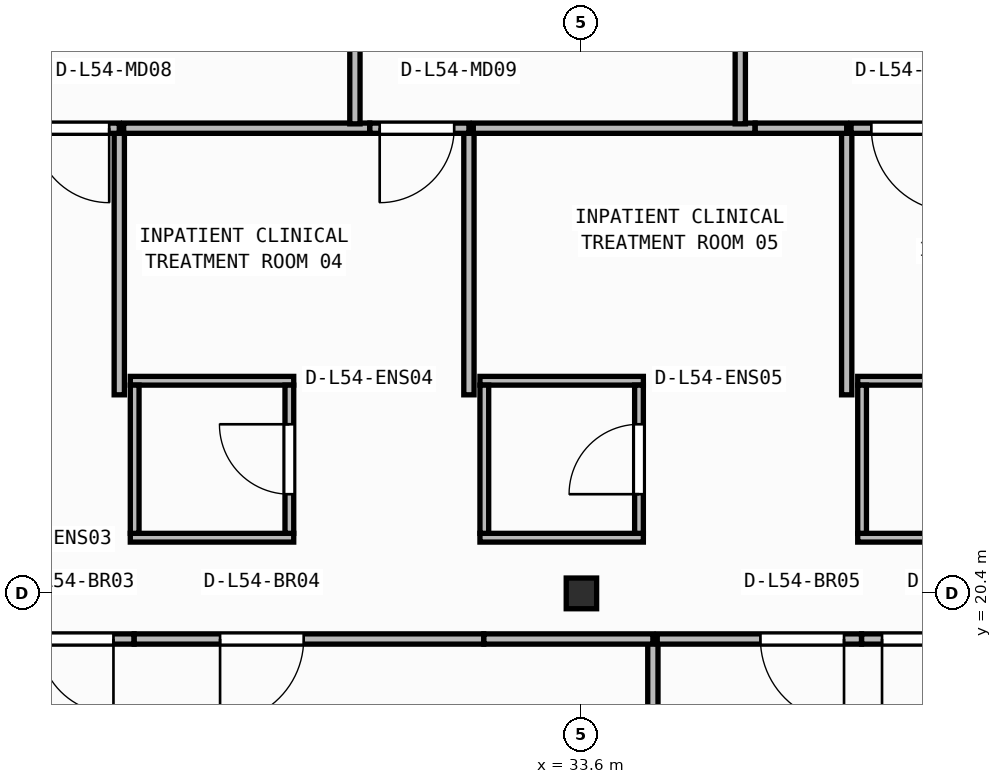
"""IFC4 building model, lengths in metres.
Left out: names, types, materials, properties, quantities, classifications, styles, units other than length and angle.
Written with IfcOpenShell. Run it as: python <this file> out.ifc"""

import sys

from ifc_helpers import new_model, si_unit, direction, frame, frame_2d, origin, origin_2d, place, context, subcontext, project, spatial, rectangle, i_section, extrude, element, fill, save


model = new_model("IFC4")
c1 = context("Model", 3, precision=1e-05, world=origin(), true_north=direction((0.0, 1.0)))
c2 = subcontext(c1, "Body", "Model", "MODEL_VIEW")
j1 = project(units=[si_unit("LENGTHUNIT", "METRE"), si_unit("PLANEANGLEUNIT", "RADIAN")], contexts=[c1])
p1 = place(None, origin())
s1 = spatial("IfcSite", under=j1, at=p1, CompositionType="ELEMENT")
p2 = place(p1, origin())
s2 = spatial("IfcBuilding", under=s1, at=p2, CompositionType="ELEMENT")
p3 = place(p2, frame((0.0, 0.0, 219.75)))
s3 = spatial("IfcBuildingStorey", under=s2, at=p3, CompositionType="ELEMENT", Elevation=219.75)
p4 = place(p3, frame((33.6, 20.4, 0.0), z_axis=(0.0, 0.0, 1.0), x_axis=(1.0, 0.0, 0.0)))
e1 = element("IfcColumn", 1, at=p4, inside=s3, PredefinedType="COLUMN", context=c2, shape_type="SweptSolid", body=[
    extrude(i_section(OverallWidth=0.4, OverallDepth=0.404, WebThickness=0.02, FlangeThickness=0.032, at=origin_2d()), origin(), (0.0, 0.0, 1.0), 3.95),
])
for number, where, z_axis, x_axis in (
    (2, (27.665, 21.133, 0.0), (0.0, 0.0, 1.0), (1.0, 0.0, 0.0)),
    (3, (27.665, 23.198, 0.0), (0.0, 0.0, 1.0), (1.0, 0.0, 0.0)),
):
    element("IfcWall", number, at=place(p3, frame(where, z_axis=z_axis, x_axis=x_axis)), inside=s3, PredefinedType="PARTITIONING", context=c2, shape_type="SweptSolid", body=[
        extrude(rectangle(XDim=2.15, YDim=0.115, at=frame_2d((1.075, 0.0))), origin(), (0.0, 0.0, 1.0), 3.71),
    ])
p5 = place(p3, frame((27.722, 21.19, 0.0), z_axis=(0.0, 0.0, 1.0), x_axis=(0.0, 1.0, 0.0)))
e4 = element("IfcWall", 4, at=p5, inside=s3, PredefinedType="PARTITIONING", context=c2, shape_type="SweptSolid", body=[
    extrude(rectangle(XDim=1.95, YDim=0.115, at=frame_2d((0.975, 0.0))), origin(), (0.0, 0.0, 1.0), 3.71),
])
p6 = place(p3, frame((29.758, 21.19, 0.0), z_axis=(0.0, 0.0, 1.0), x_axis=(0.0, 1.0, 0.0)))
e5 = element("IfcWall", 5, at=p6, inside=s3, PredefinedType="PARTITIONING", context=c2, shape_type="SweptSolid", body=[
    extrude(rectangle(XDim=1.95, YDim=0.115, at=frame_2d((0.975, 0.0))), origin(), (0.0, 0.0, 1.0), 3.71),
])
p7 = place(p6, frame((0.515, 0.0, 0.0)))
e6 = element("IfcOpeningElement", 6, at=p7, cuts=e5, PredefinedType="OPENING", context=c2, shape_type="SweptSolid", body=[
    extrude(rectangle(XDim=0.92, YDim=2.1, at=frame_2d((0.46, 1.05))), frame((0.0, 0.067, 0.0), z_axis=(0.0, -1.0, 0.0), x_axis=(1.0, 0.0, 0.0)), (0.0, 0.0, 1.0), 0.135),
])
for number, where, z_axis, x_axis in (
    (7, (32.265, 21.133, 0.0), (0.0, 0.0, 1.0), (1.0, 0.0, 0.0)),
    (8, (32.265, 23.198, 0.0), (0.0, 0.0, 1.0), (1.0, 0.0, 0.0)),
):
    element("IfcWall", number, at=place(p3, frame(where, z_axis=z_axis, x_axis=x_axis)), inside=s3, PredefinedType="PARTITIONING", context=c2, shape_type="SweptSolid", body=[
        extrude(rectangle(XDim=2.15, YDim=0.115, at=frame_2d((1.075, 0.0))), origin(), (0.0, 0.0, 1.0), 3.71),
    ])
p8 = place(p3, frame((32.323, 21.19, 0.0), z_axis=(0.0, 0.0, 1.0), x_axis=(0.0, 1.0, 0.0)))
e9 = element("IfcWall", 9, at=p8, inside=s3, PredefinedType="PARTITIONING", context=c2, shape_type="SweptSolid", body=[
    extrude(rectangle(XDim=1.95, YDim=0.115, at=frame_2d((0.975, 0.0))), origin(), (0.0, 0.0, 1.0), 3.71),
])
p9 = place(p3, frame((34.357, 21.19, 0.0), z_axis=(0.0, 0.0, 1.0), x_axis=(0.0, 1.0, 0.0)))
e10 = element("IfcWall", 10, at=p9, inside=s3, PredefinedType="PARTITIONING", context=c2, shape_type="SweptSolid", body=[
    extrude(rectangle(XDim=1.95, YDim=0.115, at=frame_2d((0.975, 0.0))), origin(), (0.0, 0.0, 1.0), 3.71),
])
p10 = place(p9, frame((0.515, 0.0, 0.0)))
e11 = element("IfcOpeningElement", 11, at=p10, cuts=e10, PredefinedType="OPENING", context=c2, shape_type="SweptSolid", body=[
    extrude(rectangle(XDim=0.92, YDim=2.1, at=frame_2d((0.46, 1.05))), frame((0.0, 0.067, 0.0), z_axis=(0.0, -1.0, 0.0), x_axis=(1.0, 0.0, 0.0)), (0.0, 0.0, 1.0), 0.135),
])
for number, where, z_axis, x_axis in (
    (12, (37.235, 21.133, 0.0), (0.0, 0.0, 1.0), (1.0, 0.0, 0.0)),
    (13, (37.235, 23.198, 0.0), (0.0, 0.0, 1.0), (1.0, 0.0, 0.0)),
):
    element("IfcWall", number, at=place(p3, frame(where, z_axis=z_axis, x_axis=x_axis)), inside=s3, PredefinedType="PARTITIONING", context=c2, shape_type="SweptSolid", body=[
        extrude(rectangle(XDim=2.15, YDim=0.115, at=frame_2d((1.075, 0.0))), origin(), (0.0, 0.0, 1.0), 3.71),
    ])
p11 = place(p3, frame((37.292, 21.19, 0.0), z_axis=(0.0, 0.0, 1.0), x_axis=(0.0, 1.0, 0.0)))
e14 = element("IfcWall", 14, at=p11, inside=s3, PredefinedType="PARTITIONING", context=c2, shape_type="SweptSolid", body=[
    extrude(rectangle(XDim=1.95, YDim=0.115, at=frame_2d((0.975, 0.0))), origin(), (0.0, 0.0, 1.0), 3.71),
])
p12 = place(p3, frame((34.54, 14.76, 0.0), z_axis=(0.0, 0.0, 1.0), x_axis=(0.0, 1.0, 0.0)))
e15 = element("IfcWall", 15, at=p12, inside=s3, PredefinedType="PARTITIONING", context=c2, shape_type="SweptSolid", body=[
    extrude(rectangle(XDim=5.04, YDim=0.135, at=frame_2d((2.52, 0.0))), origin(), (0.0, 0.0, 1.0), 3.71),
])
p13 = place(p3, frame((27.715, 19.8, 0.0), z_axis=(0.0, 0.0, 1.0), x_axis=(-1.0, 0.0, 0.0)))
e16 = element("IfcWall", 16, at=p13, inside=s3, PredefinedType="PARTITIONING", context=c2, shape_type="SweptSolid", body=[
    extrude(rectangle(XDim=4.228, YDim=0.135, at=frame_2d((2.114, 0.0))), origin(), (0.0, 0.0, 1.0), 3.71),
])
p14 = place(p13, frame((0.271, 0.0, 0.0)))
e17 = element("IfcOpeningElement", 17, at=p14, cuts=e16, PredefinedType="OPENING", context=c2, shape_type="SweptSolid", body=[
    extrude(rectangle(XDim=0.98, YDim=2.1, at=frame_2d((0.49, 1.05))), frame((0.0, 0.077, 0.0), z_axis=(0.0, -1.0, 0.0), x_axis=(1.0, 0.0, 0.0)), (0.0, 0.0, 1.0), 0.155),
])
p15 = place(p3, frame((32.315, 19.8, 0.0), z_axis=(0.0, 0.0, 1.0), x_axis=(-1.0, 0.0, 0.0)))
e18 = element("IfcWall", 18, at=p15, inside=s3, PredefinedType="PARTITIONING", context=c2, shape_type="SweptSolid", body=[
    extrude(rectangle(XDim=4.598, YDim=0.135, at=frame_2d((2.299, 0.0))), origin(), (0.0, 0.0, 1.0), 3.71),
])
p16 = place(p15, frame((2.369, 0.0, 0.0)))
e19 = element("IfcOpeningElement", 19, at=p16, cuts=e18, PredefinedType="OPENING", context=c2, shape_type="SweptSolid", body=[
    extrude(rectangle(XDim=1.1, YDim=2.1, at=frame_2d((0.55, 1.05))), frame((0.0, 0.077, 0.0), z_axis=(0.0, -1.0, 0.0), x_axis=(1.0, 0.0, 0.0)), (0.0, 0.0, 1.0), 0.155),
])
p17 = place(p3, frame((34.54, 19.8, 0.0), z_axis=(0.0, 0.0, 1.0), x_axis=(-1.0, 0.0, 0.0)))
e20 = element("IfcWall", 20, at=p17, inside=s3, PredefinedType="PARTITIONING", context=c2, shape_type="SweptSolid", body=[
    extrude(rectangle(XDim=2.223, YDim=0.135, at=frame_2d((1.112, 0.0))), origin(), (0.0, 0.0, 1.0), 3.71),
])
p18 = place(p3, frame((37.285, 19.8, 0.0), z_axis=(0.0, 0.0, 1.0), x_axis=(-1.0, 0.0, 0.0)))
e21 = element("IfcWall", 21, at=p18, inside=s3, PredefinedType="PARTITIONING", context=c2, shape_type="SweptSolid", body=[
    extrude(rectangle(XDim=2.687, YDim=0.135, at=frame_2d((1.344, 0.0))), origin(), (0.0, 0.0, 1.0), 3.71),
])
p19 = place(p18, frame((0.23, 0.0, 0.0)))
e22 = element("IfcOpeningElement", 22, at=p19, cuts=e21, PredefinedType="OPENING", context=c2, shape_type="SweptSolid", body=[
    extrude(rectangle(XDim=1.1, YDim=2.1, at=frame_2d((0.55, 1.05))), frame((0.0, 0.077, 0.0), z_axis=(0.0, -1.0, 0.0), x_axis=(1.0, 0.0, 0.0)), (0.0, 0.0, 1.0), 0.155),
])
p20 = place(p3, frame((41.515, 19.8, 0.0), z_axis=(0.0, 0.0, 1.0), x_axis=(-1.0, 0.0, 0.0)))
e23 = element("IfcWall", 23, at=p20, inside=s3, PredefinedType="PARTITIONING", context=c2, shape_type="SweptSolid", body=[
    extrude(rectangle(XDim=4.228, YDim=0.135, at=frame_2d((2.114, 0.0))), origin(), (0.0, 0.0, 1.0), 3.71),
])
p21 = place(p20, frame((2.86, 0.0, 0.0)))
e24 = element("IfcOpeningElement", 24, at=p21, cuts=e23, PredefinedType="OPENING", context=c2, shape_type="SweptSolid", body=[
    extrude(rectangle(XDim=1.1, YDim=2.1, at=frame_2d((0.55, 1.05))), frame((0.0, 0.077, 0.0), z_axis=(0.0, -1.0, 0.0), x_axis=(1.0, 0.0, 0.0)), (0.0, 0.0, 1.0), 0.155),
])
p22 = place(p3, frame((27.52, 23.012, 0.0), z_axis=(0.0, 0.0, 1.0), x_axis=(0.0, 1.0, 0.0)))
e25 = element("IfcWall", 25, at=p22, inside=s3, PredefinedType="PARTITIONING", context=c2, shape_type="SweptSolid", body=[
    extrude(rectangle(XDim=3.508, YDim=0.135, at=frame_2d((1.754, 0.0))), origin(), (0.0, 0.0, 1.0), 3.71),
])
p23 = place(p3, frame((27.52, 26.52, 0.0), z_axis=(0.0, 0.0, 1.0), x_axis=(-1.0, 0.0, 0.0)))
e26 = element("IfcWall", 26, at=p23, inside=s3, PredefinedType="PARTITIONING", context=c2, shape_type="SweptSolid", body=[
    extrude(rectangle(XDim=1.374, YDim=0.135, at=frame_2d((0.687, 0.0))), origin(), (0.0, 0.0, 1.0), 3.71),
])
p24 = place(p23, frame((0.133, 0.0, 0.0)))
e27 = element("IfcOpeningElement", 27, at=p24, cuts=e26, PredefinedType="OPENING", context=c2, shape_type="SweptSolid", body=[
    extrude(rectangle(XDim=0.98, YDim=2.1, at=frame_2d((0.49, 1.05))), frame((0.0, 0.077, 0.0), z_axis=(0.0, -1.0, 0.0), x_axis=(1.0, 0.0, 0.0)), (0.0, 0.0, 1.0), 0.155),
])
p25 = place(p3, frame((32.12, 23.012, 0.0), z_axis=(0.0, 0.0, 1.0), x_axis=(0.0, 1.0, 0.0)))
e28 = element("IfcWall", 28, at=p25, inside=s3, PredefinedType="PARTITIONING", context=c2, shape_type="SweptSolid", body=[
    extrude(rectangle(XDim=3.508, YDim=0.135, at=frame_2d((1.754, 0.0))), origin(), (0.0, 0.0, 1.0), 3.71),
])
p26 = place(p3, frame((30.815, 26.52, 0.0), z_axis=(0.0, 0.0, 1.0), x_axis=(-1.0, 0.0, 0.0)))
e29 = element("IfcWall", 29, at=p26, inside=s3, PredefinedType="PARTITIONING", context=c2, shape_type="SweptSolid", body=[
    extrude(rectangle(XDim=3.237, YDim=0.135, at=frame_2d((1.619, 0.0))), origin(), (0.0, 0.0, 1.0), 3.71),
])
p27 = place(p3, frame((32.12, 26.52, 0.0), z_axis=(0.0, 0.0, 1.0), x_axis=(-1.0, 0.0, 0.0)))
e30 = element("IfcWall", 30, at=p27, inside=s3, PredefinedType="PARTITIONING", context=c2, shape_type="SweptSolid", body=[
    extrude(rectangle(XDim=1.303, YDim=0.135, at=frame_2d((0.652, 0.0))), origin(), (0.0, 0.0, 1.0), 3.71),
])
p28 = place(p27, frame((0.194, 0.0, 0.0)))
e31 = element("IfcOpeningElement", 31, at=p28, cuts=e30, PredefinedType="OPENING", context=c2, shape_type="SweptSolid", body=[
    extrude(rectangle(XDim=0.98, YDim=2.1, at=frame_2d((0.49, 1.05))), frame((0.0, 0.077, 0.0), z_axis=(0.0, -1.0, 0.0), x_axis=(1.0, 0.0, 0.0)), (0.0, 0.0, 1.0), 0.155),
])
p29 = place(p3, frame((37.09, 23.012, 0.0), z_axis=(0.0, 0.0, 1.0), x_axis=(0.0, 1.0, 0.0)))
e32 = element("IfcWall", 32, at=p29, inside=s3, PredefinedType="PARTITIONING", context=c2, shape_type="SweptSolid", body=[
    extrude(rectangle(XDim=3.508, YDim=0.135, at=frame_2d((1.754, 0.0))), origin(), (0.0, 0.0, 1.0), 3.71),
])
p30 = place(p3, frame((35.885, 26.52, 0.0), z_axis=(0.0, 0.0, 1.0), x_axis=(-1.0, 0.0, 0.0)))
e33 = element("IfcWall", 33, at=p30, inside=s3, PredefinedType="PARTITIONING", context=c2, shape_type="SweptSolid", body=[
    extrude(rectangle(XDim=3.707, YDim=0.135, at=frame_2d((1.854, 0.0))), origin(), (0.0, 0.0, 1.0), 3.71),
])
p31 = place(p3, frame((37.09, 26.52, 0.0), z_axis=(0.0, 0.0, 1.0), x_axis=(-1.0, 0.0, 0.0)))
e34 = element("IfcWall", 34, at=p31, inside=s3, PredefinedType="PARTITIONING", context=c2, shape_type="SweptSolid", body=[
    extrude(rectangle(XDim=1.203, YDim=0.135, at=frame_2d((0.602, 0.0))), origin(), (0.0, 0.0, 1.0), 3.71),
])
p32 = place(p3, frame((41.32, 26.52, 0.0), z_axis=(0.0, 0.0, 1.0), x_axis=(-1.0, 0.0, 0.0)))
e35 = element("IfcWall", 35, at=p32, inside=s3, PredefinedType="PARTITIONING", context=c2, shape_type="SweptSolid", body=[
    extrude(rectangle(XDim=4.173, YDim=0.135, at=frame_2d((2.086, 0.0))), origin(), (0.0, 0.0, 1.0), 3.71),
])
p33 = place(p32, frame((2.806, 0.0, 0.0)))
e36 = element("IfcOpeningElement", 36, at=p33, cuts=e35, PredefinedType="OPENING", context=c2, shape_type="SweptSolid", body=[
    extrude(rectangle(XDim=1.1, YDim=2.1, at=frame_2d((0.55, 1.05))), frame((0.0, 0.077, 0.0), z_axis=(0.0, -1.0, 0.0), x_axis=(1.0, 0.0, 0.0)), (0.0, 0.0, 1.0), 0.155),
])
p34 = place(p3, frame((30.62, 26.577, 0.0), z_axis=(0.0, 0.0, 1.0), x_axis=(0.0, 1.0, 0.0)))
e37 = element("IfcWall", 37, at=p34, inside=s3, PredefinedType="PARTITIONING", context=c2, shape_type="SweptSolid", body=[
    extrude(rectangle(XDim=4.472, YDim=0.135, at=frame_2d((2.236, 0.0))), origin(), (0.0, 0.0, 1.0), 3.71),
])
p35 = place(p3, frame((35.69, 26.577, 0.0), z_axis=(0.0, 0.0, 1.0), x_axis=(0.0, 1.0, 0.0)))
e38 = element("IfcWall", 38, at=p35, inside=s3, PredefinedType="PARTITIONING", context=c2, shape_type="SweptSolid", body=[
    extrude(rectangle(XDim=4.178, YDim=0.135, at=frame_2d((2.089, 0.0))), origin(), (0.0, 0.0, 1.0), 3.71),
])
p36 = place(p7, origin())
e39 = element("IfcDoor", 39, at=p36, inside=s3, OperationType="SINGLE_SWING_RIGHT", PredefinedType="DOOR", context=c2, shape_type="SweptSolid", body=[
    extrude(rectangle(XDim=0.92, YDim=2.1, at=frame_2d((0.46, 1.05))), frame((0.0, 0.025, 0.0), z_axis=(0.0, -1.0, 0.0), x_axis=(1.0, 0.0, 0.0)), (0.0, 0.0, 1.0), 0.05),
])
fill(e6, e39)
p37 = place(p10, origin())
e40 = element("IfcDoor", 40, at=p37, inside=s3, OperationType="SINGLE_SWING_LEFT", PredefinedType="DOOR", context=c2, shape_type="SweptSolid", body=[
    extrude(rectangle(XDim=0.92, YDim=2.1, at=frame_2d((0.46, 1.05))), frame((0.0, 0.025, 0.0), z_axis=(0.0, -1.0, 0.0), x_axis=(1.0, 0.0, 0.0)), (0.0, 0.0, 1.0), 0.05),
])
fill(e11, e40)
p38 = place(p14, origin())
e41 = element("IfcDoor", 41, at=p38, inside=s3, OperationType="SINGLE_SWING_LEFT", PredefinedType="DOOR", context=c2, shape_type="SweptSolid", body=[
    extrude(rectangle(XDim=0.98, YDim=2.1, at=frame_2d((0.49, 1.05))), frame((0.0, 0.025, 0.0), z_axis=(0.0, -1.0, 0.0), x_axis=(1.0, 0.0, 0.0)), (0.0, 0.0, 1.0), 0.05),
])
fill(e17, e41)
p39 = place(p16, origin())
e42 = element("IfcDoor", 42, at=p39, inside=s3, OperationType="SINGLE_SWING_RIGHT", PredefinedType="DOOR", context=c2, shape_type="SweptSolid", body=[
    extrude(rectangle(XDim=1.1, YDim=2.1, at=frame_2d((0.55, 1.05))), frame((0.0, 0.025, 0.0), z_axis=(0.0, -1.0, 0.0), x_axis=(1.0, 0.0, 0.0)), (0.0, 0.0, 1.0), 0.05),
])
fill(e19, e42)
p40 = place(p19, origin())
e43 = element("IfcDoor", 43, at=p40, inside=s3, OperationType="SINGLE_SWING_LEFT", PredefinedType="DOOR", context=c2, shape_type="SweptSolid", body=[
    extrude(rectangle(XDim=1.1, YDim=2.1, at=frame_2d((0.55, 1.05))), frame((0.0, 0.025, 0.0), z_axis=(0.0, -1.0, 0.0), x_axis=(1.0, 0.0, 0.0)), (0.0, 0.0, 1.0), 0.05),
])
fill(e22, e43)
p41 = place(p21, origin())
e44 = element("IfcDoor", 44, at=p41, inside=s3, OperationType="SINGLE_SWING_RIGHT", PredefinedType="DOOR", context=c2, shape_type="SweptSolid", body=[
    extrude(rectangle(XDim=1.1, YDim=2.1, at=frame_2d((0.55, 1.05))), frame((0.0, 0.025, 0.0), z_axis=(0.0, -1.0, 0.0), x_axis=(1.0, 0.0, 0.0)), (0.0, 0.0, 1.0), 0.05),
])
fill(e24, e44)
p42 = place(p24, origin())
e45 = element("IfcDoor", 45, at=p42, inside=s3, OperationType="SINGLE_SWING_LEFT", PredefinedType="DOOR", context=c2, shape_type="SweptSolid", body=[
    extrude(rectangle(XDim=0.98, YDim=2.1, at=frame_2d((0.49, 1.05))), frame((0.0, 0.025, 0.0), z_axis=(0.0, -1.0, 0.0), x_axis=(1.0, 0.0, 0.0)), (0.0, 0.0, 1.0), 0.05),
])
fill(e27, e45)
p43 = place(p28, origin())
e46 = element("IfcDoor", 46, at=p43, inside=s3, OperationType="SINGLE_SWING_RIGHT", PredefinedType="DOOR", context=c2, shape_type="SweptSolid", body=[
    extrude(rectangle(XDim=0.98, YDim=2.1, at=frame_2d((0.49, 1.05))), frame((0.0, 0.025, 0.0), z_axis=(0.0, -1.0, 0.0), x_axis=(1.0, 0.0, 0.0)), (0.0, 0.0, 1.0), 0.05),
])
fill(e31, e46)
p44 = place(p33, origin())
e47 = element("IfcDoor", 47, at=p44, inside=s3, OperationType="SINGLE_SWING_LEFT", PredefinedType="DOOR", context=c2, shape_type="SweptSolid", body=[
    extrude(rectangle(XDim=1.1, YDim=2.1, at=frame_2d((0.55, 1.05))), frame((0.0, 0.025, 0.0), z_axis=(0.0, -1.0, 0.0), x_axis=(1.0, 0.0, 0.0)), (0.0, 0.0, 1.0), 0.05),
])
fill(e36, e47)
save(model, sys.argv[1])
